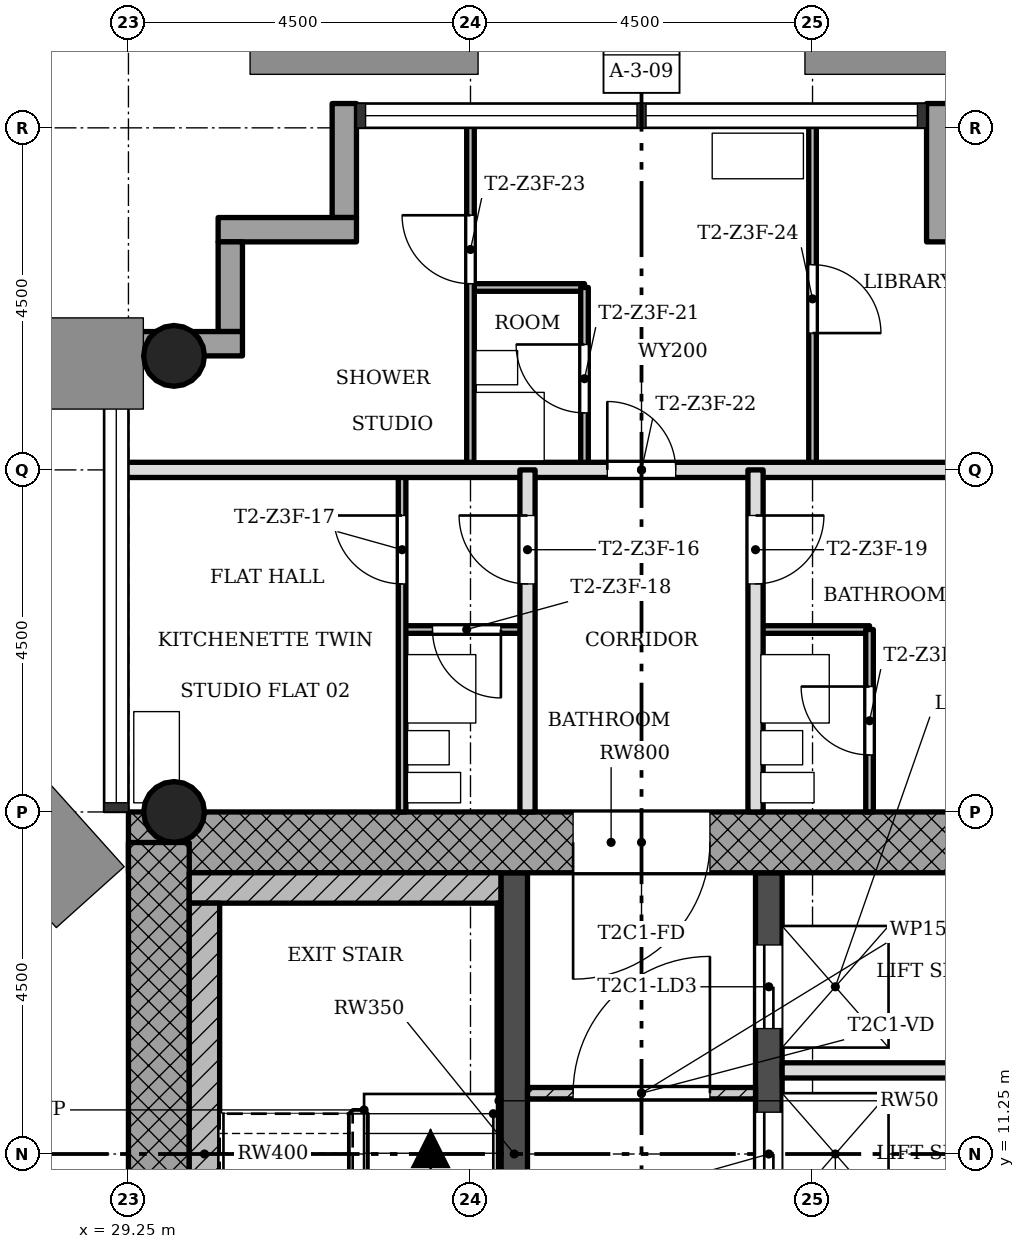
"""IFC4 building model, lengths in metres.
Left out: names, types, materials, properties, quantities, classifications, styles, units other than length and angle.
Written with IfcOpenShell. Run it as: python <this file> out.ifc"""

import sys

from ifc_helpers import new_model, si_unit, direction, frame, frame_2d, origin, origin_2d, place, context, subcontext, project, spatial, rectangle, hollow_circle, extrude, element, fill, save


model = new_model("IFC4")
c1 = context("Model", 3, precision=1e-05, world=origin(), true_north=direction((0.0, 1.0)))
c2 = subcontext(c1, "Body", "Model", "MODEL_VIEW")
j1 = project(units=[si_unit("LENGTHUNIT", "METRE"), si_unit("PLANEANGLEUNIT", "RADIAN")], contexts=[c1])
p1 = place(None, origin())
s1 = spatial("IfcSite", under=j1, at=p1, CompositionType="ELEMENT")
p2 = place(p1, origin())
s2 = spatial("IfcBuilding", under=s1, at=p2, CompositionType="ELEMENT")
p3 = place(p2, frame((0.0, 0.0, 164.3)))
s3 = spatial("IfcBuildingStorey", under=s2, at=p3, CompositionType="ELEMENT", Elevation=164.3)
p4 = place(p3, frame((41.95, 15.35, 0.0), z_axis=(0.0, 0.0, 1.0), x_axis=(-1.0, 0.0, 0.0)))
e1 = element("IfcWall", 1, at=p4, inside=s3, PredefinedType="SHEAR", context=c2, shape_type="SweptSolid", body=[
    extrude(rectangle(XDim=12.7, YDim=0.8, at=frame_2d((6.35, 0.0))), origin(), (0.0, 0.0, 1.0), 3.4),
])
p5 = place(p4, frame((5.05, 0.0, 0.0)))
e2 = element("IfcOpeningElement", 2, at=p5, cuts=e1, PredefinedType="OPENING", context=c2, shape_type="SweptSolid", body=[
    extrude(rectangle(XDim=1.8, YDim=2.1, at=frame_2d((0.9, 1.05))), frame((0.0, 0.41, 0.0), z_axis=(0.0, -1.0, 0.0), x_axis=(1.0, 0.0, 0.0)), (0.0, 0.0, 1.0), 0.82),
])
p6 = place(p3, frame((29.65, 15.348, 0.0), z_axis=(0.0, 0.0, 1.0), x_axis=(0.0, -1.0, 0.0)))
e3 = element("IfcWall", 3, at=p6, inside=s3, PredefinedType="SHEAR", context=c2, shape_type="SweptSolid", body=[
    extrude(rectangle(XDim=8.796, YDim=0.8, at=frame_2d((4.398, 0.0))), origin(), (0.0, 0.0, 1.0), 3.4),
])
p7 = place(p3, frame((34.325, 7.55, 0.0), z_axis=(0.0, 0.0, 1.0), x_axis=(0.0, 1.0, 0.0)))
e4 = element("IfcWall", 4, at=p7, inside=s3, PredefinedType="SHEAR", context=c2, shape_type="SweptSolid", body=[
    extrude(rectangle(XDim=7.4, YDim=0.35, at=frame_2d((3.7, 0.0))), origin(), (0.0, 0.0, 1.0), 3.4),
])
p8 = place(p7, frame((0.85, 0.0, 0.0)))
e5 = element("IfcOpeningElement", 5, at=p8, cuts=e4, PredefinedType="OPENING", context=c2, shape_type="SweptSolid", body=[
    extrude(rectangle(XDim=0.9, YDim=2.1, at=frame_2d((0.45, 1.05))), frame((0.0, 0.185, 0.0), z_axis=(0.0, -1.0, 0.0), x_axis=(1.0, 0.0, 0.0)), (0.0, 0.0, 1.0), 0.37),
])
p9 = place(p3, frame((37.675, 7.55, 0.0), z_axis=(0.0, 0.0, 1.0), x_axis=(0.0, 1.0, 0.0)))
e6 = element("IfcWall", 6, at=p9, inside=s3, PredefinedType="SHEAR", context=c2, shape_type="SweptSolid", body=[
    extrude(rectangle(XDim=7.4, YDim=0.35, at=frame_2d((3.7, 0.0))), origin(), (0.0, 0.0, 1.0), 3.4),
])
p10 = place(p9, frame((0.95, 0.0, 0.0)))
e7 = element("IfcOpeningElement", 7, at=p10, cuts=e6, PredefinedType="OPENING", context=c2, shape_type="SweptSolid", body=[
    extrude(rectangle(XDim=1.1, YDim=2.1, at=frame_2d((0.55, 1.05))), frame((0.0, 0.185, 0.0), z_axis=(0.0, -1.0, 0.0), x_axis=(1.0, 0.0, 0.0)), (0.0, 0.0, 1.0), 0.37),
])
p11 = place(p9, frame((3.15, 0.0, 0.0)))
e8 = element("IfcOpeningElement", 8, at=p11, cuts=e6, PredefinedType="OPENING", context=c2, shape_type="SweptSolid", body=[
    extrude(rectangle(XDim=1.1, YDim=2.1, at=frame_2d((0.55, 1.05))), frame((0.0, 0.185, 0.0), z_axis=(0.0, -1.0, 0.0), x_axis=(1.0, 0.0, 0.0)), (0.0, 0.0, 1.0), 0.37),
])
p12 = place(p9, frame((5.35, 0.0, 0.0)))
e9 = element("IfcOpeningElement", 9, at=p12, cuts=e6, PredefinedType="OPENING", context=c2, shape_type="SweptSolid", body=[
    extrude(rectangle(XDim=1.1, YDim=2.1, at=frame_2d((0.55, 1.05))), frame((0.0, 0.185, 0.0), z_axis=(0.0, -1.0, 0.0), x_axis=(1.0, 0.0, 0.0)), (0.0, 0.0, 1.0), 0.37),
])
for number, where, z_axis, x_axis in (
    (10, (29.85, 15.75, 0.0), (0.0, 0.0, 1.0), (1.0, 0.0, 0.0)),
    (11, (29.85, 21.75, 0.0), (0.0, 0.0, 1.0), (1.0, 0.0, 0.0)),
):
    element("IfcColumn", number, at=place(p3, frame(where, z_axis=z_axis, x_axis=x_axis)), inside=s3, PredefinedType="COLUMN", context=c2, shape_type="SweptSolid", body=[
        extrude(hollow_circle(Radius=0.4, WallThickness=0.028, at=origin_2d()), origin(), (0.0, 0.0, 1.0), 3.4),
    ])
p13 = place(p3, frame((39.91, 23.25, -0.3), z_axis=(0.0, 0.0, 1.0), x_axis=(0.0, 1.0, 0.0)))
e12 = element("IfcWall", 12, at=p13, inside=s3, PredefinedType="STANDARD", context=c2, shape_type="SweptSolid", body=[
    extrude(rectangle(XDim=1.82, YDim=0.32, at=frame_2d((0.91, 0.0))), origin(), (0.0, 0.0, 1.0), 3.4),
])
p14 = place(p3, frame((32.09, 25.07, -0.3), z_axis=(0.0, 0.0, 1.0), x_axis=(0.0, -1.0, 0.0)))
e13 = element("IfcWall", 13, at=p14, inside=s3, PredefinedType="STANDARD", context=c2, shape_type="SweptSolid", body=[
    extrude(rectangle(XDim=1.5, YDim=0.32, at=frame_2d((0.75, 0.0))), origin(), (0.0, 0.0, 1.0), 3.4),
])
p15 = place(p3, frame((32.25, 23.41, -0.3), z_axis=(0.0, 0.0, 1.0), x_axis=(-1.0, 0.0, 0.0)))
e14 = element("IfcWall", 14, at=p15, inside=s3, PredefinedType="STANDARD", context=c2, shape_type="SweptSolid", body=[
    extrude(rectangle(XDim=1.82, YDim=0.32, at=frame_2d((0.91, 0.0))), origin(), (0.0, 0.0, 1.0), 3.4),
])
p16 = place(p3, frame((30.59, 23.25, -0.3), z_axis=(0.0, 0.0, 1.0), x_axis=(0.0, -1.0, 0.0)))
e15 = element("IfcWall", 15, at=p16, inside=s3, PredefinedType="STANDARD", context=c2, shape_type="SweptSolid", body=[
    extrude(rectangle(XDim=1.18, YDim=0.32, at=frame_2d((0.59, 0.0))), origin(), (0.0, 0.0, 1.0), 3.4),
])
p17 = place(p3, frame((30.75, 21.91, -0.3), z_axis=(0.0, 0.0, 1.0), x_axis=(-1.0, 0.0, 0.0)))
e16 = element("IfcWall", 16, at=p17, inside=s3, PredefinedType="STANDARD", context=c2, shape_type="SweptSolid", body=[
    extrude(rectangle(XDim=1.82, YDim=0.32, at=frame_2d((0.91, 0.0))), origin(), (0.0, 0.0, 1.0), 3.4),
])
p18 = place(p3, frame((37.5, 12.05, 0.0), z_axis=(0.0, 0.0, 1.0), x_axis=(-1.0, 0.0, 0.0)))
e17 = element("IfcWall", 17, at=p18, inside=s3, PredefinedType="PARTITIONING", context=c2, shape_type="SweptSolid", body=[
    extrude(rectangle(XDim=3.0, YDim=0.15, at=frame_2d((1.5, 0.0))), origin(), (0.0, 0.0, 1.0), 3.0),
])
p19 = place(p18, frame((0.6, 0.0, 0.0)))
e18 = element("IfcOpeningElement", 18, at=p19, cuts=e17, PredefinedType="OPENING", context=c2, shape_type="SweptSolid", body=[
    extrude(rectangle(XDim=1.8, YDim=2.1, at=frame_2d((0.9, 1.05))), frame((0.0, 0.085, 0.0), z_axis=(0.0, -1.0, 0.0), x_axis=(1.0, 0.0, 0.0)), (0.0, 0.0, 1.0), 0.17),
])
p20 = place(p3, frame((41.95, 12.35, 0.0), z_axis=(0.0, 0.0, 1.0), x_axis=(-1.0, 0.0, 0.0)))
e19 = element("IfcWall", 19, at=p20, inside=s3, PredefinedType="SOLIDWALL", context=c2, shape_type="SweptSolid", body=[
    extrude(rectangle(XDim=4.1, YDim=0.2, at=frame_2d((2.05, 0.0))), origin(), (0.0, 0.0, 1.0), 3.0),
])
p21 = place(p3, frame((39.0, 18.15, 0.0), z_axis=(0.0, 0.0, 1.0), x_axis=(-1.0, 0.0, 0.0)))
e20 = element("IfcWall", 20, at=p21, inside=s3, PredefinedType="PARTITIONING", context=c2, shape_type="SweptSolid", body=[
    extrude(rectangle(XDim=1.5, YDim=0.1, at=frame_2d((0.75, 0.0))), origin(), (0.0, 0.0, 1.0), 3.0),
])
p22 = place(p3, frame((34.5, 18.15, 0.0), z_axis=(0.0, 0.0, 1.0), x_axis=(-1.0, 0.0, 0.0)))
e21 = element("IfcWall", 21, at=p22, inside=s3, PredefinedType="PARTITIONING", context=c2, shape_type="SweptSolid", body=[
    extrude(rectangle(XDim=1.65, YDim=0.1, at=frame_2d((0.825, 0.0))), origin(), (0.0, 0.0, 1.0), 3.0),
])
p23 = place(p22, frame((0.35, 0.0, 0.0)))
e22 = element("IfcOpeningElement", 22, at=p23, cuts=e21, PredefinedType="OPENING", context=c2, shape_type="SweptSolid", body=[
    extrude(rectangle(XDim=0.9, YDim=2.1, at=frame_2d((0.45, 1.05))), frame((0.0, 0.06, 0.0), z_axis=(0.0, -1.0, 0.0), x_axis=(1.0, 0.0, 0.0)), (0.0, 0.0, 1.0), 0.12),
])
p24 = place(p3, frame((42.85, 20.25, 0.0), z_axis=(0.0, 0.0, 1.0), x_axis=(-1.0, 0.0, 0.0)))
e23 = element("IfcWall", 23, at=p24, inside=s3, PredefinedType="SOLIDWALL", context=c2, shape_type="SweptSolid", body=[
    extrude(rectangle(XDim=13.7, YDim=0.2, at=frame_2d((6.85, 0.0))), origin(), (0.0, 0.0, 1.0), 3.0),
])
p25 = place(p24, frame((6.4, 0.0, 0.0)))
e24 = element("IfcOpeningElement", 24, at=p25, cuts=e23, PredefinedType="OPENING", context=c2, shape_type="SweptSolid", body=[
    extrude(rectangle(XDim=0.9, YDim=2.1, at=frame_2d((0.45, 1.05))), frame((0.0, 0.11, 0.0), z_axis=(0.0, -1.0, 0.0), x_axis=(1.0, 0.0, 0.0)), (0.0, 0.0, 1.0), 0.22),
])
p26 = place(p3, frame((35.25, 22.65, 0.0), z_axis=(0.0, 0.0, 1.0), x_axis=(-1.0, 0.0, 0.0)))
e25 = element("IfcWall", 25, at=p26, inside=s3, PredefinedType="PARTITIONING", context=c2, shape_type="SweptSolid", body=[
    extrude(rectangle(XDim=1.5, YDim=0.1, at=frame_2d((0.75, 0.0))), origin(), (0.0, 0.0, 1.0), 3.0),
])
p27 = place(p3, frame((39.0, 15.75, 0.0), z_axis=(0.0, 0.0, 1.0), x_axis=(0.0, 1.0, 0.0)))
e26 = element("IfcWall", 26, at=p27, inside=s3, PredefinedType="PARTITIONING", context=c2, shape_type="SweptSolid", body=[
    extrude(rectangle(XDim=2.4, YDim=0.1, at=frame_2d((1.2, 0.0))), origin(), (0.0, 0.0, 1.0), 3.0),
])
p28 = place(p27, frame((0.75, 0.0, 0.0)))
e27 = element("IfcOpeningElement", 27, at=p28, cuts=e26, PredefinedType="OPENING", context=c2, shape_type="SweptSolid", body=[
    extrude(rectangle(XDim=0.9, YDim=2.1, at=frame_2d((0.45, 1.05))), frame((0.0, 0.06, 0.0), z_axis=(0.0, -1.0, 0.0), x_axis=(1.0, 0.0, 0.0)), (0.0, 0.0, 1.0), 0.12),
])
p29 = place(p3, frame((38.25, 20.25, 0.0), z_axis=(0.0, 0.0, 1.0), x_axis=(0.0, 1.0, 0.0)))
e28 = element("IfcWall", 28, at=p29, inside=s3, PredefinedType="PARTITIONING", context=c2, shape_type="SweptSolid", body=[
    extrude(rectangle(XDim=4.6, YDim=0.1, at=frame_2d((2.3, 0.0))), origin(), (0.0, 0.0, 1.0), 3.0),
])
p30 = place(p29, frame((1.8, 0.0, 0.0)))
e29 = element("IfcOpeningElement", 29, at=p30, cuts=e28, PredefinedType="OPENING", context=c2, shape_type="SweptSolid", body=[
    extrude(rectangle(XDim=0.9, YDim=2.1, at=frame_2d((0.45, 1.05))), frame((0.0, 0.06, 0.0), z_axis=(0.0, -1.0, 0.0), x_axis=(1.0, 0.0, 0.0)), (0.0, 0.0, 1.0), 0.12),
])
p31 = place(p3, frame((37.5, 15.75, 0.0), z_axis=(0.0, 0.0, 1.0), x_axis=(0.0, 1.0, 0.0)))
e30 = element("IfcWall", 30, at=p31, inside=s3, PredefinedType="SOLIDWALL", context=c2, shape_type="SweptSolid", body=[
    extrude(rectangle(XDim=4.5, YDim=0.2, at=frame_2d((2.25, 0.0))), origin(), (0.0, 0.0, 1.0), 3.0),
])
p32 = place(p31, frame((3.0, 0.0, 0.0)))
e31 = element("IfcOpeningElement", 31, at=p32, cuts=e30, PredefinedType="OPENING", context=c2, shape_type="SweptSolid", body=[
    extrude(rectangle(XDim=0.9, YDim=2.1, at=frame_2d((0.45, 1.05))), frame((0.0, 0.11, 0.0), z_axis=(0.0, -1.0, 0.0), x_axis=(1.0, 0.0, 0.0)), (0.0, 0.0, 1.0), 0.22),
])
p33 = place(p3, frame((35.25, 20.25, 0.0), z_axis=(0.0, 0.0, 1.0), x_axis=(0.0, 1.0, 0.0)))
e32 = element("IfcWall", 32, at=p33, inside=s3, PredefinedType="PARTITIONING", context=c2, shape_type="SweptSolid", body=[
    extrude(rectangle(XDim=2.4, YDim=0.1, at=frame_2d((1.2, 0.0))), origin(), (0.0, 0.0, 1.0), 3.0),
])
p34 = place(p33, frame((0.75, 0.0, 0.0)))
e33 = element("IfcOpeningElement", 33, at=p34, cuts=e32, PredefinedType="OPENING", context=c2, shape_type="SweptSolid", body=[
    extrude(rectangle(XDim=0.9, YDim=2.1, at=frame_2d((0.45, 1.05))), frame((0.0, 0.06, 0.0), z_axis=(0.0, -1.0, 0.0), x_axis=(1.0, 0.0, 0.0)), (0.0, 0.0, 1.0), 0.12),
])
p35 = place(p3, frame((34.5, 15.75, 0.0), z_axis=(0.0, 0.0, 1.0), x_axis=(0.0, 1.0, 0.0)))
e34 = element("IfcWall", 34, at=p35, inside=s3, PredefinedType="SOLIDWALL", context=c2, shape_type="SweptSolid", body=[
    extrude(rectangle(XDim=4.5, YDim=0.2, at=frame_2d((2.25, 0.0))), origin(), (0.0, 0.0, 1.0), 3.0),
])
p36 = place(p35, frame((3.0, 0.0, 0.0)))
e35 = element("IfcOpeningElement", 35, at=p36, cuts=e34, PredefinedType="OPENING", context=c2, shape_type="SweptSolid", body=[
    extrude(rectangle(XDim=0.9, YDim=2.1, at=frame_2d((0.45, 1.05))), frame((0.0, 0.11, 0.0), z_axis=(0.0, -1.0, 0.0), x_axis=(1.0, 0.0, 0.0)), (0.0, 0.0, 1.0), 0.22),
])
p37 = place(p3, frame((33.75, 20.25, 0.0), z_axis=(0.0, 0.0, 1.0), x_axis=(0.0, 1.0, 0.0)))
e36 = element("IfcWall", 36, at=p37, inside=s3, PredefinedType="PARTITIONING", context=c2, shape_type="SweptSolid", body=[
    extrude(rectangle(XDim=4.6, YDim=0.1, at=frame_2d((2.3, 0.0))), origin(), (0.0, 0.0, 1.0), 3.0),
])
p38 = place(p37, frame((2.45, 0.0, 0.0)))
e37 = element("IfcOpeningElement", 37, at=p38, cuts=e36, PredefinedType="OPENING", context=c2, shape_type="SweptSolid", body=[
    extrude(rectangle(XDim=0.9, YDim=2.1, at=frame_2d((0.45, 1.05))), frame((0.0, 0.06, 0.0), z_axis=(0.0, -1.0, 0.0), x_axis=(1.0, 0.0, 0.0)), (0.0, 0.0, 1.0), 0.12),
])
p39 = place(p3, frame((32.85, 15.75, 0.0), z_axis=(0.0, 0.0, 1.0), x_axis=(0.0, 1.0, 0.0)))
e38 = element("IfcWall", 38, at=p39, inside=s3, PredefinedType="PARTITIONING", context=c2, shape_type="SweptSolid", body=[
    extrude(rectangle(XDim=4.5, YDim=0.1, at=frame_2d((2.25, 0.0))), origin(), (0.0, 0.0, 1.0), 3.0),
])
p40 = place(p39, frame((3.0, 0.0, 0.0)))
e39 = element("IfcOpeningElement", 39, at=p40, cuts=e38, PredefinedType="OPENING", context=c2, shape_type="SweptSolid", body=[
    extrude(rectangle(XDim=0.9, YDim=2.1, at=frame_2d((0.45, 1.05))), frame((0.0, 0.06, 0.0), z_axis=(0.0, -1.0, 0.0), x_axis=(1.0, 0.0, 0.0)), (0.0, 0.0, 1.0), 0.12),
])
p41 = place(p3, frame((34.15, 14.75, 0.0), z_axis=(0.0, 0.0, 1.0), x_axis=(-1.0, 0.0, 0.0)))
e40 = element("IfcWall", 40, at=p41, inside=s3, PredefinedType="SHEAR", context=c2, shape_type="SweptSolid", body=[
    extrude(rectangle(XDim=4.1, YDim=0.4, at=frame_2d((2.05, 0.0))), origin(), (0.0, 0.0, 1.0), 3.4),
])
p42 = place(p3, frame((30.25, 7.95, 0.0), z_axis=(0.0, 0.0, 1.0), x_axis=(0.0, 1.0, 0.0)))
e41 = element("IfcWall", 41, at=p42, inside=s3, PredefinedType="SHEAR", context=c2, shape_type="SweptSolid", body=[
    extrude(rectangle(XDim=6.6, YDim=0.4, at=frame_2d((3.3, 0.0))), origin(), (0.0, 0.0, 1.0), 3.4),
])
p43 = place(p3, frame((34.125, 9.35, 0.0), z_axis=(0.0, 0.0, 1.0), x_axis=(0.0, 1.0, 0.0)))
e42 = element("IfcWall", 42, at=p43, inside=s3, PredefinedType="SHEAR", context=c2, shape_type="SweptSolid", body=[
    extrude(rectangle(XDim=5.2, YDim=0.05, at=frame_2d((2.6, 0.0))), origin(), (0.0, 0.0, 1.0), 3.4),
])
p44 = place(p19, origin())
e43 = element("IfcDoor", 43, at=p44, inside=s3, OperationType="SINGLE_SWING_LEFT", PredefinedType="DOOR", context=c2, shape_type="SweptSolid", body=[
    extrude(rectangle(XDim=1.8, YDim=2.1, at=frame_2d((0.9, 1.05))), frame((0.0, 0.025, 0.0), z_axis=(0.0, -1.0, 0.0), x_axis=(1.0, 0.0, 0.0)), (0.0, 0.0, 1.0), 0.05),
])
fill(e18, e43)
p45 = place(p36, origin())
e44 = element("IfcDoor", 44, at=p45, inside=s3, OperationType="SINGLE_SWING_LEFT", PredefinedType="DOOR", context=c2, shape_type="SweptSolid", body=[
    extrude(rectangle(XDim=0.9, YDim=2.1, at=frame_2d((0.45, 1.05))), frame((0.0, 0.025, 0.0), z_axis=(0.0, -1.0, 0.0), x_axis=(1.0, 0.0, 0.0)), (0.0, 0.0, 1.0), 0.05),
])
fill(e35, e44)
p46 = place(p40, origin())
e45 = element("IfcDoor", 45, at=p46, inside=s3, OperationType="SINGLE_SWING_LEFT", PredefinedType="DOOR", context=c2, shape_type="SweptSolid", body=[
    extrude(rectangle(XDim=0.9, YDim=2.1, at=frame_2d((0.45, 1.05))), frame((0.0, 0.025, 0.0), z_axis=(0.0, -1.0, 0.0), x_axis=(1.0, 0.0, 0.0)), (0.0, 0.0, 1.0), 0.05),
])
fill(e39, e45)
p47 = place(p23, origin())
e46 = element("IfcDoor", 46, at=p47, inside=s3, OperationType="SINGLE_SWING_RIGHT", PredefinedType="DOOR", context=c2, shape_type="SweptSolid", body=[
    extrude(rectangle(XDim=0.9, YDim=2.1, at=frame_2d((0.45, 1.05))), frame((0.0, 0.025, 0.0), z_axis=(0.0, -1.0, 0.0), x_axis=(1.0, 0.0, 0.0)), (0.0, 0.0, 1.0), 0.05),
])
fill(e22, e46)
p48 = place(p32, origin())
e47 = element("IfcDoor", 47, at=p48, inside=s3, OperationType="SINGLE_SWING_RIGHT", PredefinedType="DOOR", context=c2, shape_type="SweptSolid", body=[
    extrude(rectangle(XDim=0.9, YDim=2.1, at=frame_2d((0.45, 1.05))), frame((0.0, 0.025, 0.0), z_axis=(0.0, -1.0, 0.0), x_axis=(1.0, 0.0, 0.0)), (0.0, 0.0, 1.0), 0.05),
])
fill(e31, e47)
p49 = place(p28, origin())
e48 = element("IfcDoor", 48, at=p49, inside=s3, OperationType="SINGLE_SWING_LEFT", PredefinedType="DOOR", context=c2, shape_type="SweptSolid", body=[
    extrude(rectangle(XDim=0.9, YDim=2.1, at=frame_2d((0.45, 1.05))), frame((0.0, 0.025, 0.0), z_axis=(0.0, -1.0, 0.0), x_axis=(1.0, 0.0, 0.0)), (0.0, 0.0, 1.0), 0.05),
])
fill(e27, e48)
p50 = place(p34, origin())
e49 = element("IfcDoor", 49, at=p50, inside=s3, OperationType="SINGLE_SWING_LEFT", PredefinedType="DOOR", context=c2, shape_type="SweptSolid", body=[
    extrude(rectangle(XDim=0.9, YDim=2.1, at=frame_2d((0.45, 1.05))), frame((0.0, 0.025, 0.0), z_axis=(0.0, -1.0, 0.0), x_axis=(1.0, 0.0, 0.0)), (0.0, 0.0, 1.0), 0.05),
])
fill(e33, e49)
p51 = place(p25, origin())
e50 = element("IfcDoor", 50, at=p51, inside=s3, OperationType="SINGLE_SWING_RIGHT", PredefinedType="DOOR", context=c2, shape_type="SweptSolid", body=[
    extrude(rectangle(XDim=0.9, YDim=2.1, at=frame_2d((0.45, 1.05))), frame((0.0, 0.025, 0.0), z_axis=(0.0, -1.0, 0.0), x_axis=(1.0, 0.0, 0.0)), (0.0, 0.0, 1.0), 0.05),
])
fill(e24, e50)
p52 = place(p38, origin())
e51 = element("IfcDoor", 51, at=p52, inside=s3, OperationType="SINGLE_SWING_LEFT", PredefinedType="DOOR", context=c2, shape_type="SweptSolid", body=[
    extrude(rectangle(XDim=0.9, YDim=2.1, at=frame_2d((0.45, 1.05))), frame((0.0, 0.025, 0.0), z_axis=(0.0, -1.0, 0.0), x_axis=(1.0, 0.0, 0.0)), (0.0, 0.0, 1.0), 0.05),
])
fill(e37, e51)
p53 = place(p30, origin())
e52 = element("IfcDoor", 52, at=p53, inside=s3, OperationType="SINGLE_SWING_LEFT", PredefinedType="DOOR", context=c2, shape_type="SweptSolid", body=[
    extrude(rectangle(XDim=0.9, YDim=2.1, at=frame_2d((0.45, 1.05))), frame((0.0, 0.025, 0.0), z_axis=(0.0, -1.0, 0.0), x_axis=(1.0, 0.0, 0.0)), (0.0, 0.0, 1.0), 0.05),
])
fill(e29, e52)
p54 = place(p11, origin())
e53 = element("IfcDoor", 53, at=p54, inside=s3, OperationType="SLIDING_TO_LEFT", PredefinedType="DOOR", context=c2, shape_type="SweptSolid", body=[
    extrude(rectangle(XDim=1.1, YDim=2.1, at=frame_2d((0.55, 1.05))), frame((0.0, 0.025, 0.0), z_axis=(0.0, -1.0, 0.0), x_axis=(1.0, 0.0, 0.0)), (0.0, 0.0, 1.0), 0.05),
])
fill(e8, e53)
p55 = place(p12, origin())
e54 = element("IfcDoor", 54, at=p55, inside=s3, OperationType="SLIDING_TO_LEFT", PredefinedType="DOOR", context=c2, shape_type="SweptSolid", body=[
    extrude(rectangle(XDim=1.1, YDim=2.1, at=frame_2d((0.55, 1.05))), frame((0.0, 0.025, 0.0), z_axis=(0.0, -1.0, 0.0), x_axis=(1.0, 0.0, 0.0)), (0.0, 0.0, 1.0), 0.05),
])
fill(e9, e54)
p56 = place(p5, origin())
e55 = element("IfcDoor", 55, at=p56, inside=s3, OperationType="SINGLE_SWING_LEFT", PredefinedType="DOOR", context=c2, shape_type="SweptSolid", body=[
    extrude(rectangle(XDim=1.8, YDim=2.1, at=frame_2d((0.9, 1.05))), frame((0.0, 0.025, 0.0), z_axis=(0.0, -1.0, 0.0), x_axis=(1.0, 0.0, 0.0)), (0.0, 0.0, 1.0), 0.05),
])
fill(e2, e55)
save(model, sys.argv[1])
